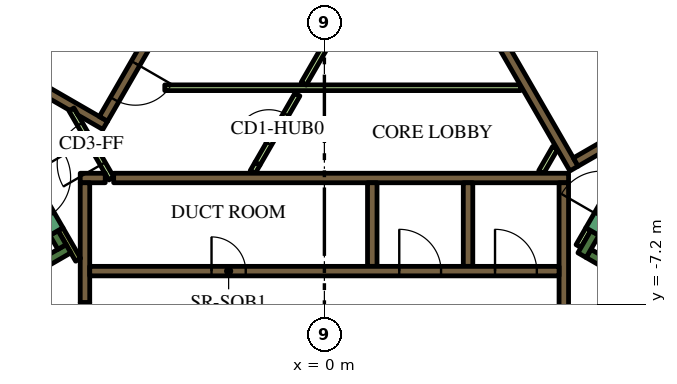
"""IFC4 building model, lengths in metres.
Left out: names, types, materials, properties, quantities, classifications, styles, units other than length and angle.
Written with IfcOpenShell. Run it as: python <this file> out.ifc"""

import sys

from ifc_helpers import new_model, si_unit, direction, frame, frame_2d, origin, place, context, subcontext, project, spatial, polyline, rectangle, outline, extrude, element, fill, save


model = new_model("IFC4")
c1 = context("Model", 3, precision=1e-05, world=origin(), true_north=direction((0.0, 1.0)))
c2 = subcontext(c1, "Body", "Model", "MODEL_VIEW")
j1 = project(units=[si_unit("LENGTHUNIT", "METRE"), si_unit("PLANEANGLEUNIT", "RADIAN")], contexts=[c1])
p1 = place(None, origin())
s1 = spatial("IfcSite", under=j1, at=p1, CompositionType="ELEMENT")
p2 = place(p1, origin())
s2 = spatial("IfcBuilding", under=s1, at=p2, CompositionType="ELEMENT")
p3 = place(p2, frame((0.0, 0.0, 99.3)))
s3 = spatial("IfcBuildingStorey", under=s2, at=p3, CompositionType="ELEMENT", Elevation=99.3)
p4 = place(p3, frame((6.776, 13.364, 0.0), z_axis=(0.0, 0.0, 1.0), x_axis=(0.500004177138, -0.8660229921, 0.0)))
e1 = element("IfcWall", 1, at=p4, inside=s3, PredefinedType="SOLIDWALL", context=c2, shape_type="SweptSolid", body=[
    extrude(rectangle(XDim=20.204, YDim=0.9, at=frame_2d((10.102, 0.0))), origin(), (0.0, 0.0, 1.0), 3.9),
])
p5 = place(p3, frame((-15.36, -1.503, 0.0), z_axis=(0.0, 0.0, 1.0), x_axis=(0.50000389221, 0.866023156604, 0.0)))
e2 = element("IfcWall", 2, at=p5, inside=s3, PredefinedType="SOLIDWALL", context=c2, shape_type="SweptSolid", body=[
    extrude(rectangle(XDim=21.0, YDim=0.9, at=frame_2d((10.5, 0.0))), origin(), (0.0, 0.0, 1.0), 3.9),
])
p6 = place(p3, frame((12.84, -9.261, 0.0), z_axis=(0.0, 0.0, 1.0), x_axis=(-0.866013990052, 0.500019768644, 0.0)))
e3 = element("IfcWall", 3, at=p6, inside=s3, PredefinedType="SOLIDWALL", context=c2, shape_type="SweptSolid", body=[
    extrude(rectangle(XDim=6.8, YDim=0.25, at=frame_2d((3.4, 0.0))), origin(), (0.0, 0.0, 1.0), 3.9),
])
p7 = place(p3, frame((6.78, -5.906, 0.0), z_axis=(0.0, 0.0, 1.0), x_axis=(0.500223362819, 0.865896406789, 0.0)))
e4 = element("IfcWall", 4, at=p7, inside=s3, PredefinedType="SOLIDWALL", context=c2, shape_type="SweptSolid", body=[
    extrude(rectangle(XDim=0.675, YDim=0.25, at=frame_2d((0.337, 0.0))), origin(), (0.0, 0.0, 1.0), 3.9),
])
p8 = place(p3, frame((-12.84, -9.261, 0.0), z_axis=(0.0, 0.0, 1.0), x_axis=(0.866016039709, 0.500016218704, 0.0)))
e5 = element("IfcWall", 5, at=p8, inside=s3, PredefinedType="SOLIDWALL", context=c2, shape_type="SweptSolid", body=[
    extrude(rectangle(XDim=7.05, YDim=0.25, at=frame_2d((3.525, 0.0))), origin(), (0.0, 0.0, 1.0), 3.9),
])
p9 = place(p3, frame((-6.905, -5.69, 0.0), z_axis=(0.0, 0.0, 1.0), x_axis=(-0.500402024738, 0.865793170242, 0.0)))
e6 = element("IfcWall", 6, at=p9, inside=s3, PredefinedType="SOLIDWALL", context=c2, shape_type="SweptSolid", body=[
    extrude(rectangle(XDim=0.425, YDim=0.25, at=frame_2d((0.212, 0.0))), origin(), (0.0, 0.0, 1.0), 3.9),
])
p10 = place(p3, frame((-5.545, -3.875, 0.0), z_axis=(0.0, 0.0, 1.0), x_axis=(1.0, 0.0, 0.0)))
e7 = element("IfcWall", 7, at=p10, inside=s3, PredefinedType="SOLIDWALL", context=c2, shape_type="SweptSolid", body=[
    extrude(rectangle(XDim=11.97, YDim=0.25, at=frame_2d((5.985, 0.0))), origin(), (0.0, 0.0, 1.0), 3.9),
])
p11 = place(p3, frame((-6.425, -3.875, 0.0), z_axis=(0.0, 0.0, 1.0), x_axis=(1.0, 0.0, 0.0)))
e8 = element("IfcWall", 8, at=p11, inside=s3, PredefinedType="SOLIDWALL", context=c2, shape_type="SweptSolid", body=[
    extrude(rectangle(XDim=0.658, YDim=0.25, at=frame_2d((0.329, 0.0))), origin(), (0.0, 0.0, 1.0), 3.9),
])
p12 = place(p3, frame((6.3, -7.268, 0.0), z_axis=(0.0, 0.0, 1.0), x_axis=(0.0, 1.0, 0.0)))
e9 = element("IfcWall", 9, at=p12, inside=s3, PredefinedType="SOLIDWALL", context=c2, shape_type="SweptSolid", body=[
    extrude(rectangle(XDim=3.268, YDim=0.25, at=frame_2d((1.634, 0.0))), origin(), (0.0, 0.0, 1.0), 3.9),
])
for number, where, z_axis, x_axis in (
    (10, (3.78, -4.0, 0.0), (0.0, 0.0, 1.0), (0.0, -1.0, 0.0)),
    (11, (1.26, -4.0, 0.0), (0.0, 0.0, 1.0), (0.0, -1.0, 0.0)),
):
    element("IfcWall", number, at=place(p3, frame(where, z_axis=z_axis, x_axis=x_axis)), inside=s3, PredefinedType="SOLIDWALL", context=c2, shape_type="SweptSolid", body=[
        extrude(rectangle(XDim=2.2, YDim=0.25, at=frame_2d((1.1, 0.0))), origin(), (0.0, 0.0, 1.0), 3.9),
    ])
p13 = place(p3, frame((-6.3, -4.0, 0.0), z_axis=(0.0, 0.0, 1.0), x_axis=(0.0, -1.0, 0.0)))
e12 = element("IfcWall", 12, at=p13, inside=s3, PredefinedType="SOLIDWALL", context=c2, shape_type="SweptSolid", body=[
    extrude(rectangle(XDim=3.154, YDim=0.25, at=frame_2d((1.577, 0.0))), origin(), (0.0, 0.0, 1.0), 3.9),
])
p14 = place(p3, origin())
e13 = element("IfcWall", 13, at=p14, inside=s3, PredefinedType="SOLIDWALL", context=c2, shape_type="SweptSolid", body=[
    extrude(outline(polyline([(0.566, 6.725), (0.566, 6.875), (0.566, 6.875), (0.565, 6.875), (0.361, 6.875), (0.035, 7.439), (0.252, 7.564), (0.377, 7.348), (6.552, -3.348), (6.677, -3.564), (6.46, -3.689), (0.448, 6.725), (0.565, 6.725), (0.566, 6.725), (0.566, 6.725)])), origin(), (0.0, 0.0, 1.0), 3.9),
])
p15 = place(p3, frame((6.614, -3.456, 0.0), z_axis=(0.0, 0.0, 1.0), x_axis=(0.866031582473, 0.499989298045, 0.0)))
e14 = element("IfcWall", 14, at=p15, inside=s3, PredefinedType="SOLIDWALL", context=c2, shape_type="SweptSolid", body=[
    extrude(rectangle(XDim=2.455, YDim=0.25, at=frame_2d((1.228, 0.0))), origin(), (0.0, 0.0, 1.0), 3.9),
])
p16 = place(p3, frame((-8.06, -1.311, 0.0), z_axis=(0.0, 0.0, 1.0), x_axis=(0.50000273126, 0.866023826885, 0.0)))
e15 = element("IfcWall", 15, at=p16, inside=s3, PredefinedType="SOLIDWALL", context=c2, shape_type="SweptSolid", body=[
    extrude(rectangle(XDim=10.33, YDim=0.25, at=frame_2d((5.165, 0.0))), origin(), (0.0, 0.0, 1.0), 3.9),
])
e16 = element("IfcWall", 16, at=p14, inside=s3, PredefinedType="SOLIDWALL", context=c2, shape_type="SweptSolid", body=[
    extrude(outline(polyline([(-5.922, -2.257), (-5.922, -2.257), (-5.705, -2.382), (-5.83, -2.598), (-6.483, -2.221), (-6.591, -2.033), (-6.591, -2.033), (-6.7, -2.096), (-7.952, -1.373), (-7.827, -1.156), (-5.922, -2.257)])), origin(), (0.0, 0.0, 1.0), 3.9),
])
p17 = place(p3, frame((-6.48, -6.027, 0.0), z_axis=(0.0, 0.0, 1.0), x_axis=(-0.499927229454, 0.866067413802, 0.0)))
e17 = element("IfcWall", 17, at=p17, inside=s3, PredefinedType="PARTITIONING", context=c2, shape_type="SweptSolid", body=[
    extrude(rectangle(XDim=0.929, YDim=0.15, at=frame_2d((0.464, 0.0))), origin(), (0.0, 0.0, 1.0), 3.9),
])
p18 = place(p3, frame((-1.887, -3.718, 0.0), z_axis=(0.0, 0.0, 1.0), x_axis=(0.500165633897, 0.865929753888, 0.0)))
e18 = element("IfcWall", 18, at=p18, inside=s3, PredefinedType="PARTITIONING", context=c2, shape_type="SweptSolid", body=[
    extrude(rectangle(XDim=0.254, YDim=0.15, at=frame_2d((0.127, 0.0))), origin(), (0.0, 0.0, 1.0), 2.75),
])
p19 = place(p3, frame((6.945, -5.222, 0.0), z_axis=(0.0, 0.0, 1.0), x_axis=(-0.499818422106, -0.866130212453, 0.0)))
e19 = element("IfcWall", 19, at=p19, inside=s3, PredefinedType="PARTITIONING", context=c2, shape_type="SweptSolid", body=[
    extrude(rectangle(XDim=0.514, YDim=0.15, at=frame_2d((0.257, 0.0))), origin(), (0.0, 0.0, 1.0), 2.75),
])
p20 = place(p3, frame((5.705, -3.718, 0.0), z_axis=(0.0, 0.0, 1.0), x_axis=(0.499962090823, 0.866047289552, 0.0)))
e20 = element("IfcWall", 20, at=p20, inside=s3, PredefinedType="PARTITIONING", context=c2, shape_type="SweptSolid", body=[
    extrude(rectangle(XDim=0.735, YDim=0.15, at=frame_2d((0.367, 0.0))), origin(), (0.0, 0.0, 1.0), 2.75),
])
p21 = place(p3, frame((-4.2, -1.5, 0.0), z_axis=(0.0, 0.0, 1.0), x_axis=(1.0, 0.0, 0.0)))
e21 = element("IfcWall", 21, at=p21, inside=s3, PredefinedType="PARTITIONING", context=c2, shape_type="SweptSolid", body=[
    extrude(rectangle(XDim=9.359, YDim=0.15, at=frame_2d((4.68, 0.0))), origin(), (0.0, 0.0, 1.0), 2.75),
])
p22 = place(p3, frame((-0.544, -1.393, 0.0), z_axis=(0.0, 0.0, 1.0), x_axis=(0.499928740635, 0.866066541489, 0.0)))
e22 = element("IfcWall", 22, at=p22, inside=s3, PredefinedType="PARTITIONING", context=c2, shape_type="SweptSolid", body=[
    extrude(rectangle(XDim=1.912, YDim=0.15, at=frame_2d((0.956, 0.0))), origin(), (0.0, 0.0, 1.0), 2.75),
])
p23 = place(p3, frame((-6.175, -6.325, 0.0), z_axis=(0.0, 0.0, 1.0), x_axis=(1.0, 0.0, 0.0)))
e23 = element("IfcWall", 23, at=p23, inside=s3, PredefinedType="SOLIDWALL", context=c2, shape_type="SweptSolid", body=[
    extrude(rectangle(XDim=12.35, YDim=0.25, at=frame_2d((6.175, 0.0))), origin(), (0.0, 0.0, 1.0), 3.9),
])
p24 = place(p23, frame((3.205, 0.0, 0.0)))
e24 = element("IfcOpeningElement", 24, at=p24, cuts=e23, PredefinedType="OPENING", context=c2, shape_type="SweptSolid", body=[
    extrude(rectangle(XDim=0.9, YDim=2.1, at=frame_2d((0.45, 1.05))), frame((0.0, 0.135, 0.0), z_axis=(0.0, -1.0, 0.0), x_axis=(1.0, 0.0, 0.0)), (0.0, 0.0, 1.0), 0.27),
])
p25 = place(p23, frame((8.145, 0.0, 0.0)))
e25 = element("IfcOpeningElement", 25, at=p25, cuts=e23, PredefinedType="OPENING", context=c2, shape_type="SweptSolid", body=[
    extrude(rectangle(XDim=1.1, YDim=2.1, at=frame_2d((0.55, 1.05))), frame((0.0, 0.135, 0.0), z_axis=(0.0, -1.0, 0.0), x_axis=(1.0, 0.0, 0.0)), (0.0, 0.0, 1.0), 0.27),
])
p26 = place(p23, frame((10.665, 0.0, 0.0)))
e26 = element("IfcOpeningElement", 26, at=p26, cuts=e23, PredefinedType="OPENING", context=c2, shape_type="SweptSolid", body=[
    extrude(rectangle(XDim=1.1, YDim=2.1, at=frame_2d((0.55, 1.05))), frame((0.0, 0.135, 0.0), z_axis=(0.0, -1.0, 0.0), x_axis=(1.0, 0.0, 0.0)), (0.0, 0.0, 1.0), 0.27),
])
p27 = place(p3, frame((8.565, -2.185, 0.0), z_axis=(0.0, 0.0, 1.0), x_axis=(-0.499997954832, 0.866026584559, 0.0)))
e27 = element("IfcWall", 27, at=p27, inside=s3, PredefinedType="SOLIDWALL", context=c2, shape_type="SweptSolid", body=[
    extrude(rectangle(XDim=12.35, YDim=0.25, at=frame_2d((6.175, 0.0))), origin(), (0.0, 0.0, 1.0), 3.9),
])
p28 = place(p27, frame((5.725, 0.0, 0.0)))
e28 = element("IfcOpeningElement", 28, at=p28, cuts=e27, PredefinedType="OPENING", context=c2, shape_type="SweptSolid", body=[
    extrude(rectangle(XDim=0.9, YDim=2.1, at=frame_2d((0.45, 1.05))), frame((0.0, 0.135, 0.0), z_axis=(0.0, -1.0, 0.0), x_axis=(1.0, 0.0, 0.0)), (0.0, 0.0, 1.0), 0.27),
])
p29 = place(p3, frame((-0.898, 6.194, 0.0), z_axis=(0.0, 0.0, 1.0), x_axis=(-0.499996202215, -0.866027596426, 0.0)))
e29 = element("IfcWall", 29, at=p29, inside=s3, PredefinedType="SOLIDWALL", context=c2, shape_type="SweptSolid", body=[
    extrude(rectangle(XDim=9.83, YDim=0.25, at=frame_2d((4.915, 0.0))), origin(), (0.0, 0.0, 1.0), 3.9),
])
p30 = place(p29, frame((0.585, 0.0, 0.0)))
e30 = element("IfcOpeningElement", 30, at=p30, cuts=e29, PredefinedType="OPENING", context=c2, shape_type="SweptSolid", body=[
    extrude(rectangle(XDim=1.1, YDim=2.1, at=frame_2d((0.55, 1.05))), frame((0.0, 0.135, 0.0), z_axis=(0.0, -1.0, 0.0), x_axis=(1.0, 0.0, 0.0)), (0.0, 0.0, 1.0), 0.27),
])
p31 = place(p29, frame((3.105, 0.0, 0.0)))
e31 = element("IfcOpeningElement", 31, at=p31, cuts=e29, PredefinedType="OPENING", context=c2, shape_type="SweptSolid", body=[
    extrude(rectangle(XDim=1.1, YDim=2.1, at=frame_2d((0.55, 1.05))), frame((0.0, 0.135, 0.0), z_axis=(0.0, -1.0, 0.0), x_axis=(1.0, 0.0, 0.0)), (0.0, 0.0, 1.0), 0.27),
])
p32 = place(p29, frame((5.625, 0.0, 0.0)))
e32 = element("IfcOpeningElement", 32, at=p32, cuts=e29, PredefinedType="OPENING", context=c2, shape_type="SweptSolid", body=[
    extrude(rectangle(XDim=1.1, YDim=2.1, at=frame_2d((0.55, 1.05))), frame((0.0, 0.135, 0.0), z_axis=(0.0, -1.0, 0.0), x_axis=(1.0, 0.0, 0.0)), (0.0, 0.0, 1.0), 0.27),
])
p33 = place(p29, frame((8.145, 0.0, 0.0)))
e33 = element("IfcOpeningElement", 33, at=p33, cuts=e29, PredefinedType="OPENING", context=c2, shape_type="SweptSolid", body=[
    extrude(rectangle(XDim=1.1, YDim=2.1, at=frame_2d((0.55, 1.05))), frame((0.0, 0.135, 0.0), z_axis=(0.0, -1.0, 0.0), x_axis=(1.0, 0.0, 0.0)), (0.0, 0.0, 1.0), 0.27),
])
p34 = place(p3, frame((7.053, -5.284, 0.0), z_axis=(0.0, 0.0, 1.0), x_axis=(0.500078061341, 0.865980330357, 0.0)))
e34 = element("IfcWall", 34, at=p34, inside=s3, PredefinedType="SOLIDWALL", context=c2, shape_type="SweptSolid", body=[
    extrude(rectangle(XDim=2.1, YDim=0.4, at=frame_2d((1.05, 0.0))), origin(), (0.0, 0.0, 1.0), 3.9),
])
p35 = place(p34, frame((0.45, 0.0, 0.0)))
e35 = element("IfcOpeningElement", 35, at=p35, cuts=e34, PredefinedType="OPENING", context=c2, shape_type="SweptSolid", body=[
    extrude(rectangle(XDim=1.2, YDim=2.1, at=frame_2d((0.6, 1.05))), frame((0.0, 0.21, 0.0), z_axis=(0.0, -1.0, 0.0), x_axis=(1.0, 0.0, 0.0)), (0.0, 0.0, 1.0), 0.42),
])
p36 = place(p3, frame((-8.103, -3.466, 0.0), z_axis=(0.0, 0.0, 1.0), x_axis=(0.500078061341, -0.865980330357, 0.0)))
e36 = element("IfcWall", 36, at=p36, inside=s3, PredefinedType="SOLIDWALL", context=c2, shape_type="SweptSolid", body=[
    extrude(rectangle(XDim=2.1, YDim=0.4, at=frame_2d((1.05, 0.0))), origin(), (0.0, 0.0, 1.0), 3.9),
])
p37 = place(p36, frame((0.45, 0.0, 0.0)))
e37 = element("IfcOpeningElement", 37, at=p37, cuts=e36, PredefinedType="OPENING", context=c2, shape_type="SweptSolid", body=[
    extrude(rectangle(XDim=1.2, YDim=2.1, at=frame_2d((0.6, 1.05))), frame((0.0, 0.21, 0.0), z_axis=(0.0, -1.0, 0.0), x_axis=(1.0, 0.0, 0.0)), (0.0, 0.0, 1.0), 0.42),
])
p38 = place(p3, frame((-6.3, -7.154, 0.0), z_axis=(0.0, 0.0, 1.0), x_axis=(0.0, -1.0, 0.0)))
e38 = element("IfcWall", 38, at=p38, inside=s3, PredefinedType="SOLIDWALL", context=c2, shape_type="SweptSolid", body=[
    extrude(rectangle(XDim=1.8, YDim=0.25, at=frame_2d((0.9, 0.0))), origin(), (0.0, 0.0, 1.0), 3.9),
])
p39 = place(p38, frame((0.45, 0.0, 0.0)))
e39 = element("IfcOpeningElement", 39, at=p39, cuts=e38, PredefinedType="OPENING", context=c2, shape_type="SweptSolid", body=[
    extrude(rectangle(XDim=0.9, YDim=2.1, at=frame_2d((0.45, 1.05))), frame((0.0, 0.135, 0.0), z_axis=(0.0, -1.0, 0.0), x_axis=(1.0, 0.0, 0.0)), (0.0, 0.0, 1.0), 0.27),
])
p40 = place(p3, frame((-1.76, -3.498, 0.0), z_axis=(0.0, 0.0, 1.0), x_axis=(0.499977374825, 0.866038466041, 0.0)))
e40 = element("IfcWall", 40, at=p40, inside=s3, PredefinedType="PARTITIONING", context=c2, shape_type="SweptSolid", body=[
    extrude(rectangle(XDim=2.1, YDim=0.15, at=frame_2d((1.05, 0.0))), origin(), (0.0, 0.0, 1.0), 2.75),
])
p41 = place(p40, frame((0.6, 0.0, 0.0)))
e41 = element("IfcOpeningElement", 41, at=p41, cuts=e40, PredefinedType="OPENING", context=c2, shape_type="SweptSolid", body=[
    extrude(rectangle(XDim=0.9, YDim=2.1, at=frame_2d((0.45, 1.05))), frame((0.0, 0.085, 0.0), z_axis=(0.0, -1.0, 0.0), x_axis=(1.0, 0.0, 0.0)), (0.0, 0.0, 1.0), 0.17),
])
p42 = place(p3, frame((-5.606, -3.89, 0.0), z_axis=(0.0, 0.0, 1.0), x_axis=(-0.500027713859, 0.866009402589, 0.0)))
e42 = element("IfcWall", 42, at=p42, inside=s3, PredefinedType="PARTITIONING", context=c2, shape_type="SweptSolid", body=[
    extrude(rectangle(XDim=2.1, YDim=0.15, at=frame_2d((1.05, 0.0))), origin(), (0.0, 0.0, 1.0), 2.75),
])
p43 = place(p42, frame((0.45, 0.0, 0.0)))
e43 = element("IfcOpeningElement", 43, at=p43, cuts=e42, PredefinedType="OPENING", context=c2, shape_type="SweptSolid", body=[
    extrude(rectangle(XDim=1.2, YDim=2.1, at=frame_2d((0.6, 1.05))), frame((0.0, 0.085, 0.0), z_axis=(0.0, -1.0, 0.0), x_axis=(1.0, 0.0, 0.0)), (0.0, 0.0, 1.0), 0.17),
])
p44 = place(p3, frame((6.163, 18.475, 0.0), z_axis=(0.0, 0.0, 1.0), x_axis=(0.500001317485, -0.866024643133, 0.0)))
e44 = element("IfcWall", 44, at=p44, inside=s3, PredefinedType="PARTITIONING", context=c2, shape_type="SweptSolid", body=[
    extrude(rectangle(XDim=25.767, YDim=0.15, at=frame_2d((12.883, 0.0))), origin(), (0.0, 0.0, 1.0), 2.75),
])
p45 = place(p44, frame((24.241, 0.0, 0.0)))
e45 = element("IfcOpeningElement", 45, at=p45, cuts=e44, PredefinedType="OPENING", context=c2, shape_type="SweptSolid", body=[
    extrude(rectangle(XDim=1.0, YDim=2.1, at=frame_2d((0.5, 1.05))), frame((0.0, 0.085, 0.0), z_axis=(0.0, -1.0, 0.0), x_axis=(1.0, 0.0, 0.0)), (0.0, 0.0, 1.0), 0.17),
])
p46 = place(p44, frame((13.144, 0.0, 0.0)))
e46 = element("IfcOpeningElement", 46, at=p46, cuts=e44, PredefinedType="OPENING", context=c2, shape_type="SweptSolid", body=[
    extrude(rectangle(XDim=1.0, YDim=2.1, at=frame_2d((0.5, 1.05))), frame((0.0, 0.085, 0.0), z_axis=(0.0, -1.0, 0.0), x_axis=(1.0, 0.0, 0.0)), (0.0, 0.0, 1.0), 0.17),
])
p47 = place(p44, frame((11.592, 0.0, 0.0)))
e47 = element("IfcOpeningElement", 47, at=p47, cuts=e44, PredefinedType="OPENING", context=c2, shape_type="SweptSolid", body=[
    extrude(rectangle(XDim=1.1, YDim=2.1, at=frame_2d((0.55, 1.05))), frame((0.0, 0.085, 0.0), z_axis=(0.0, -1.0, 0.0), x_axis=(1.0, 0.0, 0.0)), (0.0, 0.0, 1.0), 0.17),
])
p48 = place(p44, frame((4.674, 0.0, 0.0)))
e48 = element("IfcOpeningElement", 48, at=p48, cuts=e44, PredefinedType="OPENING", context=c2, shape_type="SweptSolid", body=[
    extrude(rectangle(XDim=0.9, YDim=2.1, at=frame_2d((0.45, 1.05))), frame((0.0, 0.085, 0.0), z_axis=(0.0, -1.0, 0.0), x_axis=(1.0, 0.0, 0.0)), (0.0, 0.0, 1.0), 0.17),
])
p49 = place(p44, frame((2.411, 0.0, 0.0)))
e49 = element("IfcOpeningElement", 49, at=p49, cuts=e44, PredefinedType="OPENING", context=c2, shape_type="SweptSolid", body=[
    extrude(rectangle(XDim=1.0, YDim=2.1, at=frame_2d((0.5, 1.05))), frame((0.0, 0.085, 0.0), z_axis=(0.0, -1.0, 0.0), x_axis=(1.0, 0.0, 0.0)), (0.0, 0.0, 1.0), 0.17),
])
p50 = place(p3, frame((-19.081, -3.9, 0.0), z_axis=(0.0, 0.0, 1.0), x_axis=(0.499998313975, 0.866026377209, 0.0)))
e50 = element("IfcWall", 50, at=p50, inside=s3, PredefinedType="PARTITIONING", context=c2, shape_type="SweptSolid", body=[
    extrude(rectangle(XDim=25.766, YDim=0.15, at=frame_2d((12.883, 0.0))), origin(), (0.0, 0.0, 1.0), 2.75),
])
p51 = place(p50, frame((19.306, 0.0, 0.0)))
e51 = element("IfcOpeningElement", 51, at=p51, cuts=e50, PredefinedType="OPENING", context=c2, shape_type="SweptSolid", body=[
    extrude(rectangle(XDim=1.0, YDim=2.1, at=frame_2d((0.5, 1.05))), frame((0.0, 0.085, 0.0), z_axis=(0.0, -1.0, 0.0), x_axis=(1.0, 0.0, 0.0)), (0.0, 0.0, 1.0), 0.17),
])
p52 = place(p50, frame((17.144, 0.0, 0.0)))
e52 = element("IfcOpeningElement", 52, at=p52, cuts=e50, PredefinedType="OPENING", context=c2, shape_type="SweptSolid", body=[
    extrude(rectangle(XDim=0.9, YDim=2.1, at=frame_2d((0.45, 1.05))), frame((0.0, 0.085, 0.0), z_axis=(0.0, -1.0, 0.0), x_axis=(1.0, 0.0, 0.0)), (0.0, 0.0, 1.0), 0.17),
])
p53 = place(p50, frame((9.955, 0.0, 0.0)))
e53 = element("IfcOpeningElement", 53, at=p53, cuts=e50, PredefinedType="OPENING", context=c2, shape_type="SweptSolid", body=[
    extrude(rectangle(XDim=1.1, YDim=2.1, at=frame_2d((0.55, 1.05))), frame((0.0, 0.085, 0.0), z_axis=(0.0, -1.0, 0.0), x_axis=(1.0, 0.0, 0.0)), (0.0, 0.0, 1.0), 0.17),
])
p54 = place(p50, frame((8.648, 0.0, 0.0)))
e54 = element("IfcOpeningElement", 54, at=p54, cuts=e50, PredefinedType="OPENING", context=c2, shape_type="SweptSolid", body=[
    extrude(rectangle(XDim=1.0, YDim=2.1, at=frame_2d((0.5, 1.05))), frame((0.0, 0.085, 0.0), z_axis=(0.0, -1.0, 0.0), x_axis=(1.0, 0.0, 0.0)), (0.0, 0.0, 1.0), 0.17),
])
p55 = place(p50, frame((1.553, 0.0, 0.0)))
e55 = element("IfcOpeningElement", 55, at=p55, cuts=e50, PredefinedType="OPENING", context=c2, shape_type="SweptSolid", body=[
    extrude(rectangle(XDim=0.9, YDim=2.1, at=frame_2d((0.45, 1.05))), frame((0.0, 0.085, 0.0), z_axis=(0.0, -1.0, 0.0), x_axis=(1.0, 0.0, 0.0)), (0.0, 0.0, 1.0), 0.17),
])
p56 = place(p24, origin())
e56 = element("IfcDoor", 56, at=p56, inside=s3, OperationType="SINGLE_SWING_LEFT", PredefinedType="DOOR", context=c2, shape_type="SweptSolid", body=[
    extrude(rectangle(XDim=0.9, YDim=2.1, at=frame_2d((0.45, 1.05))), frame((0.0, 0.025, 0.0), z_axis=(0.0, -1.0, 0.0), x_axis=(1.0, 0.0, 0.0)), (0.0, 0.0, 1.0), 0.05),
])
fill(e24, e56)
p57 = place(p25, origin())
e57 = element("IfcDoor", 57, at=p57, inside=s3, OperationType="DOUBLE_DOOR_SLIDING", PredefinedType="DOOR", context=c2, shape_type="SweptSolid", body=[
    extrude(rectangle(XDim=1.1, YDim=2.1, at=frame_2d((0.55, 1.05))), frame((0.0, 0.025, 0.0), z_axis=(0.0, -1.0, 0.0), x_axis=(1.0, 0.0, 0.0)), (0.0, 0.0, 1.0), 0.05),
])
fill(e25, e57)
p58 = place(p26, origin())
e58 = element("IfcDoor", 58, at=p58, inside=s3, OperationType="DOUBLE_DOOR_SLIDING", PredefinedType="DOOR", context=c2, shape_type="SweptSolid", body=[
    extrude(rectangle(XDim=1.1, YDim=2.1, at=frame_2d((0.55, 1.05))), frame((0.0, 0.025, 0.0), z_axis=(0.0, -1.0, 0.0), x_axis=(1.0, 0.0, 0.0)), (0.0, 0.0, 1.0), 0.05),
])
fill(e26, e58)
p59 = place(p33, origin())
e59 = element("IfcDoor", 59, at=p59, inside=s3, OperationType="DOUBLE_DOOR_SLIDING", PredefinedType="DOOR", context=c2, shape_type="SweptSolid", body=[
    extrude(rectangle(XDim=1.1, YDim=2.1, at=frame_2d((0.55, 1.05))), frame((0.0, 0.025, 0.0), z_axis=(0.0, -1.0, 0.0), x_axis=(1.0, 0.0, 0.0)), (0.0, 0.0, 1.0), 0.05),
])
fill(e33, e59)
p60 = place(p41, origin())
e60 = element("IfcDoor", 60, at=p60, inside=s3, OperationType="SINGLE_SWING_LEFT", PredefinedType="DOOR", context=c2, shape_type="SweptSolid", body=[
    extrude(rectangle(XDim=0.9, YDim=2.1, at=frame_2d((0.45, 1.05))), frame((0.0, 0.025, 0.0), z_axis=(0.0, -1.0, 0.0), x_axis=(1.0, 0.0, 0.0)), (0.0, 0.0, 1.0), 0.05),
])
fill(e41, e60)
p61 = place(p43, origin())
e61 = element("IfcDoor", 61, at=p61, inside=s3, OperationType="SINGLE_SWING_LEFT", PredefinedType="DOOR", context=c2, shape_type="SweptSolid", body=[
    extrude(rectangle(XDim=1.2, YDim=2.1, at=frame_2d((0.6, 1.05))), frame((0.0, 0.025, 0.0), z_axis=(0.0, -1.0, 0.0), x_axis=(1.0, 0.0, 0.0)), (0.0, 0.0, 1.0), 0.05),
])
fill(e43, e61)
save(model, sys.argv[1])
